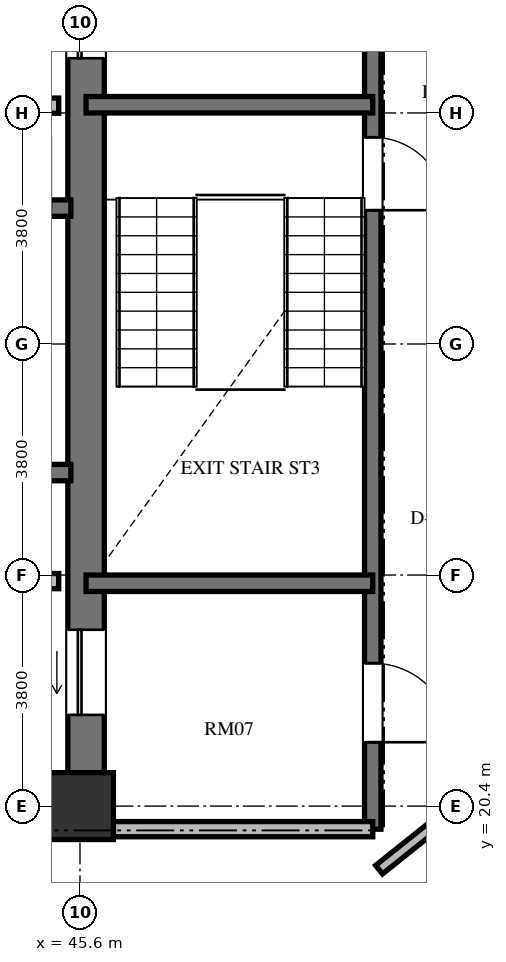
"""IFC4 building model, lengths in metres.
Left out: names, types, materials, properties, quantities, classifications, styles, units other than length and angle.
Written with IfcOpenShell. Run it as: python <this file> out.ifc"""

import sys

from ifc_helpers import new_model, si_unit, direction, frame, frame_2d, origin, origin_2d, place, context, subcontext, project, spatial, rectangle, extrude, element, fill, save


model = new_model("IFC4")
c1 = context("Model", 3, precision=1e-05, world=origin(), true_north=direction((0.0, 1.0)))
c2 = subcontext(c1, "Body", "Model", "MODEL_VIEW")
j1 = project(units=[si_unit("LENGTHUNIT", "METRE"), si_unit("PLANEANGLEUNIT", "RADIAN")], contexts=[c1])
p1 = place(None, origin())
s1 = spatial("IfcSite", under=j1, at=p1, CompositionType="ELEMENT")
p2 = place(p1, origin())
s2 = spatial("IfcBuilding", under=s1, at=p2, CompositionType="ELEMENT")
p3 = place(p2, frame((0.0, 0.0, 167.472)))
s3 = spatial("IfcBuildingStorey", under=s2, at=p3, CompositionType="ELEMENT", Elevation=167.472)
p4 = place(p3, frame((45.6, 20.4, 0.0), z_axis=(0.0, 0.0, 1.0), x_axis=(1.0, 0.0, 0.0)))
e1 = element("IfcColumn", 1, at=p4, inside=s3, PredefinedType="COLUMN", context=c2, shape_type="SweptSolid", body=[
    extrude(rectangle(XDim=1.1, YDim=1.1, at=origin_2d()), origin(), (0.0, 0.0, 1.0), 3.648),
])
p5 = place(p3, frame((45.7, 20.95, 0.0), z_axis=(0.0, 0.0, 1.0), x_axis=(0.0, 1.0, 0.0)))
e2 = element("IfcWall", 2, at=p5, inside=s3, PredefinedType="SHEAR", context=c2, shape_type="SweptSolid", body=[
    extrude(rectangle(XDim=14.1, YDim=0.6, at=frame_2d((7.05, 0.0))), origin(), (0.0, 0.0, 1.0), 3.648),
])
p6 = place(p5, frame((11.75, 0.0, 0.0)))
e3 = element("IfcOpeningElement", 3, at=p6, cuts=e2, PredefinedType="OPENING", context=c2, shape_type="SweptSolid", body=[
    extrude(rectangle(XDim=1.4, YDim=2.3, at=frame_2d((0.7, 1.15))), frame((0.0, 0.31, 0.0), z_axis=(0.0, -1.0, 0.0), x_axis=(1.0, 0.0, 0.0)), (0.0, 0.0, 1.0), 0.62),
])
p7 = place(p5, frame((0.95, 0.0, 0.0)))
e4 = element("IfcOpeningElement", 4, at=p7, cuts=e2, PredefinedType="OPENING", context=c2, shape_type="SweptSolid", body=[
    extrude(rectangle(XDim=1.4, YDim=2.3, at=frame_2d((0.7, 1.15))), frame((0.0, 0.31, 0.0), z_axis=(0.0, -1.0, 0.0), x_axis=(1.0, 0.0, 0.0)), (0.0, 0.0, 1.0), 0.62),
])
p8 = place(p3, frame((37.465, 30.235, 0.0), z_axis=(0.0, 0.0, 1.0), x_axis=(1.0, 0.0, 0.0)))
e5 = element("IfcWall", 5, at=p8, inside=s3, PredefinedType="SHEAR", context=c2, shape_type="SweptSolid", body=[
    extrude(rectangle(XDim=7.985, YDim=0.27, at=frame_2d((3.992, 0.0))), origin(), (0.0, 0.0, 1.0), 3.648),
])
p9 = place(p8, frame((6.455, 0.0, 0.0)))
e6 = element("IfcOpeningElement", 6, at=p9, cuts=e5, PredefinedType="OPENING", context=c2, shape_type="SweptSolid", body=[
    extrude(rectangle(XDim=1.2, YDim=2.15, at=frame_2d((0.6, 1.075))), frame((0.0, 0.145, 0.0), z_axis=(0.0, -1.0, 0.0), x_axis=(1.0, 0.0, 0.0)), (0.0, 0.0, 1.0), 0.29),
])
p10 = place(p3, frame((37.465, 25.885, 0.0), z_axis=(0.0, 0.0, 1.0), x_axis=(1.0, 0.0, 0.0)))
e7 = element("IfcWall", 7, at=p10, inside=s3, PredefinedType="SHEAR", context=c2, shape_type="SweptSolid", body=[
    extrude(rectangle(XDim=7.985, YDim=0.27, at=frame_2d((3.992, 0.0))), origin(), (0.0, 0.0, 1.0), 3.648),
])
for number, where, z_axis, x_axis in (
    (8, (42.95, 31.92, 0.0), (0.0, 0.0, 1.0), (1.0, 0.0, 0.0)),
    (9, (42.95, 24.1, 0.0), (0.0, 0.0, 1.0), (1.0, 0.0, 0.0)),
):
    element("IfcWall", number, at=place(p3, frame(where, z_axis=z_axis, x_axis=x_axis)), inside=s3, PredefinedType="SOLIDWALL", context=c2, shape_type="SweptSolid", body=[
        extrude(rectangle(XDim=2.3, YDim=0.25, at=frame_2d((1.15, 0.0))), origin(), (0.0, 0.0, 1.0), 3.428),
    ])
p11 = place(p3, frame((50.415, 35.845, 0.0), z_axis=(0.0, 0.0, 1.0), x_axis=(0.0, -1.0, 0.0)))
e10 = element("IfcWall", 10, at=p11, inside=s3, PredefinedType="SHEAR", context=c2, shape_type="SweptSolid", body=[
    extrude(rectangle(XDim=15.825, YDim=0.27, at=frame_2d((7.913, 0.0))), origin(), (0.0, 0.0, 1.0), 3.648),
])
p12 = place(p11, frame((4.445, 0.0, 0.0)))
e11 = element("IfcOpeningElement", 11, at=p12, cuts=e10, PredefinedType="OPENING", context=c2, shape_type="SweptSolid", body=[
    extrude(rectangle(XDim=1.2, YDim=2.15, at=frame_2d((0.6, 1.075))), frame((0.0, 0.145, 0.0), z_axis=(0.0, -1.0, 0.0), x_axis=(1.0, 0.0, 0.0)), (0.0, 0.0, 1.0), 0.29),
])
p13 = place(p11, frame((1.295, 0.0, 0.0)))
e12 = element("IfcOpeningElement", 12, at=p13, cuts=e10, PredefinedType="OPENING", context=c2, shape_type="SweptSolid", body=[
    extrude(rectangle(XDim=1.3, YDim=2.2, at=frame_2d((0.65, 1.1))), frame((0.0, 0.145, 0.0), z_axis=(0.0, -1.0, 0.0), x_axis=(1.0, 0.0, 0.0)), (0.0, 0.0, 1.0), 0.29),
])
p14 = place(p11, frame((13.095, 0.0, 0.0)))
e13 = element("IfcOpeningElement", 13, at=p14, cuts=e10, PredefinedType="OPENING", context=c2, shape_type="SweptSolid", body=[
    extrude(rectangle(XDim=1.3, YDim=2.2, at=frame_2d((0.65, 1.1))), frame((0.0, 0.145, 0.0), z_axis=(0.0, -1.0, 0.0), x_axis=(1.0, 0.0, 0.0)), (0.0, 0.0, 1.0), 0.29),
])
for number, where, z_axis, x_axis in (
    (14, (45.7, 31.935, 0.0), (0.0, 0.0, 1.0), (1.0, 0.0, 0.0)),
    (15, (45.7, 24.065, 0.0), (0.0, 0.0, 1.0), (1.0, 0.0, 0.0)),
):
    element("IfcWall", number, at=place(p3, frame(where, z_axis=z_axis, x_axis=x_axis)), inside=s3, PredefinedType="SHEAR", context=c2, shape_type="SweptSolid", body=[
        extrude(rectangle(XDim=4.715, YDim=0.27, at=frame_2d((2.357, 0.0))), origin(), (0.0, 0.0, 1.0), 3.648),
    ])
p15 = place(p3, frame((45.7, 20.02, 0.0), z_axis=(0.0, 0.0, 1.0), x_axis=(1.0, 0.0, 0.0)))
e16 = element("IfcWall", 16, at=p15, inside=s3, PredefinedType="SOLIDWALL", context=c2, shape_type="SweptSolid", body=[
    extrude(rectangle(XDim=4.715, YDim=0.25, at=frame_2d((2.357, 0.0))), origin(), (0.0, 0.0, 1.0), 3.428),
])
p16 = place(p3, frame((53.181, 21.481, 0.0), z_axis=(0.0, 0.0, 1.0), x_axis=(-0.781420737726, -0.624004511724, 0.0)))
e17 = element("IfcWall", 17, at=p16, inside=s3, PredefinedType="PARTITIONING", context=c2, shape_type="SweptSolid", body=[
    extrude(rectangle(XDim=3.407, YDim=0.18, at=frame_2d((1.704, 0.0))), origin(), (0.0, 0.0, 1.0), 3.428),
])
p17 = place(p6, origin())
e18 = element("IfcDoor", 18, at=p17, inside=s3, OperationType="SLIDING_TO_LEFT", PredefinedType="DOOR", context=c2, shape_type="SweptSolid", body=[
    extrude(rectangle(XDim=1.4, YDim=2.3, at=frame_2d((0.7, 1.15))), frame((0.0, 0.025, 0.0), z_axis=(0.0, -1.0, 0.0), x_axis=(1.0, 0.0, 0.0)), (0.0, 0.0, 1.0), 0.05),
])
fill(e3, e18)
p18 = place(p7, origin())
e19 = element("IfcDoor", 19, at=p18, inside=s3, OperationType="SLIDING_TO_LEFT", PredefinedType="DOOR", context=c2, shape_type="SweptSolid", body=[
    extrude(rectangle(XDim=1.4, YDim=2.3, at=frame_2d((0.7, 1.15))), frame((0.0, 0.025, 0.0), z_axis=(0.0, -1.0, 0.0), x_axis=(1.0, 0.0, 0.0)), (0.0, 0.0, 1.0), 0.05),
])
fill(e4, e19)
p19 = place(p12, origin())
e20 = element("IfcDoor", 20, at=p19, inside=s3, OperationType="SINGLE_SWING_RIGHT", PredefinedType="DOOR", context=c2, shape_type="SweptSolid", body=[
    extrude(rectangle(XDim=1.2, YDim=2.15, at=frame_2d((0.6, 1.075))), frame((0.0, 0.025, 0.0), z_axis=(0.0, -1.0, 0.0), x_axis=(1.0, 0.0, 0.0)), (0.0, 0.0, 1.0), 0.05),
])
fill(e11, e20)
p20 = place(p14, origin())
e21 = element("IfcDoor", 21, at=p20, inside=s3, OperationType="SINGLE_SWING_RIGHT", PredefinedType="DOOR", context=c2, shape_type="SweptSolid", body=[
    extrude(rectangle(XDim=1.3, YDim=2.2, at=frame_2d((0.65, 1.1))), frame((0.0, 0.025, 0.0), z_axis=(0.0, -1.0, 0.0), x_axis=(1.0, 0.0, 0.0)), (0.0, 0.0, 1.0), 0.05),
])
fill(e13, e21)
save(model, sys.argv[1])
